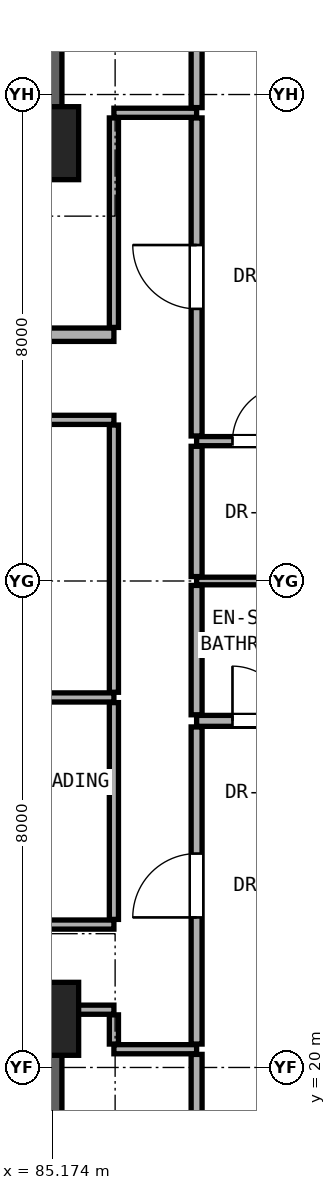
"""IFC4 building model, lengths in metres.
Left out: names, types, materials, properties, quantities, classifications, styles, units other than length and angle.
Written with IfcOpenShell. Run it as: python <this file> out.ifc"""

import sys

from ifc_helpers import new_model, si_unit, direction, frame, frame_2d, origin, origin_2d, place, context, subcontext, project, spatial, rectangle, extrude, element, fill, save


model = new_model("IFC4")
c1 = context("Model", 3, precision=1e-05, world=origin(), true_north=direction((0.0, 1.0)))
c2 = subcontext(c1, "Body", "Model", "MODEL_VIEW")
j1 = project(units=[si_unit("LENGTHUNIT", "METRE"), si_unit("PLANEANGLEUNIT", "RADIAN")], contexts=[c1])
p1 = place(None, origin())
s1 = spatial("IfcSite", under=j1, at=p1, CompositionType="ELEMENT")
p2 = place(p1, origin())
s2 = spatial("IfcBuilding", under=s1, at=p2, CompositionType="ELEMENT")
p3 = place(p2, frame((0.0, 0.0, 98.3)))
s3 = spatial("IfcBuildingStorey", under=s2, at=p3, CompositionType="ELEMENT", Elevation=98.3)
for number, where, z_axis, x_axis in (
    (1, (85.0, 20.8, 0.0), (0.0, 0.0, 1.0), (1.0, 0.0, 0.0)),
    (2, (85.0, 35.2, 0.0), (0.0, 0.0, 1.0), (1.0, 0.0, 0.0)),
):
    element("IfcColumn", number, at=place(p3, frame(where, z_axis=z_axis, x_axis=x_axis)), inside=s3, PredefinedType="COLUMN", context=c2, shape_type="SweptSolid", body=[
        extrude(rectangle(XDim=1.2, YDim=1.2, at=origin_2d()), origin(), (0.0, 0.0, 1.0), 3.3),
    ])
for number, where, z_axis, x_axis in (
    (3, (85.0, 35.2, 0.0), (0.0, 0.0, 1.0), (0.0, 1.0, 0.0)),
    (4, (85.0, 15.2, 0.0), (0.0, 0.0, 1.0), (0.0, 1.0, 0.0)),
):
    element("IfcWall", number, at=place(p3, frame(where, z_axis=z_axis, x_axis=x_axis)), inside=s3, PredefinedType="SHEAR", context=c2, shape_type="SweptSolid", body=[
        extrude(rectangle(XDim=5.6, YDim=0.65, at=frame_2d((2.8, 0.0))), origin(), (0.0, 0.0, 1.0), 3.08),
    ])
p4 = place(p3, frame((86.18, 20.3, 0.0), z_axis=(0.0, 0.0, 1.0), x_axis=(1.0, 0.0, 0.0)))
e5 = element("IfcWall", 5, at=p4, inside=s3, PredefinedType="PARTITIONING", context=c2, shape_type="SweptSolid", body=[
    extrude(rectangle(XDim=1.36, YDim=0.15, at=frame_2d((0.68, 0.0))), origin(), (0.0, 0.0, 1.0), 3.08),
])
p5 = place(p3, frame((85.32, 20.95, 0.0), z_axis=(0.0, 0.0, 1.0), x_axis=(1.0, 0.0, 0.0)))
e6 = element("IfcWall", 6, at=p5, inside=s3, PredefinedType="PARTITIONING", context=c2, shape_type="SweptSolid", body=[
    extrude(rectangle(XDim=0.86, YDim=0.15, at=frame_2d((0.43, 0.0))), origin(), (0.0, 0.0, 1.0), 2.472),
])
p6 = place(p3, frame((66.68, 22.35, 0.0), z_axis=(0.0, 0.0, 1.0), x_axis=(1.0, 0.0, 0.0)))
e7 = element("IfcWall", 7, at=p6, inside=s3, PredefinedType="PARTITIONING", context=c2, shape_type="SweptSolid", body=[
    extrude(rectangle(XDim=19.5, YDim=0.15, at=frame_2d((9.75, 0.0))), origin(), (0.0, 0.0, 1.0), 2.145),
])
p7 = place(p6, frame((8.902, 0.0, 0.0)))
e8 = element("IfcOpeningElement", 8, at=p7, cuts=e7, PredefinedType="OPENING", context=c2, shape_type="SweptSolid", body=[
    extrude(rectangle(XDim=0.85, YDim=2.01, at=frame_2d((0.425, 1.005))), frame((0.0, 0.085, 0.0), z_axis=(0.0, -1.0, 0.0), x_axis=(1.0, 0.0, 0.0)), (0.0, 0.0, 1.0), 0.17),
])
p8 = place(p6, frame((15.947, 0.0, 0.0)))
e9 = element("IfcOpeningElement", 9, at=p8, cuts=e7, PredefinedType="OPENING", context=c2, shape_type="SweptSolid", body=[
    extrude(rectangle(XDim=0.85, YDim=2.01, at=frame_2d((0.425, 1.005))), frame((0.0, 0.085, 0.0), z_axis=(0.0, -1.0, 0.0), x_axis=(1.0, 0.0, 0.0)), (0.0, 0.0, 1.0), 0.17),
])
p9 = place(p3, frame((87.54, 25.7, 0.0), z_axis=(0.0, 0.0, 1.0), x_axis=(1.0, 0.0, 0.0)))
e10 = element("IfcWall", 10, at=p9, inside=s3, PredefinedType="PARTITIONING", context=c2, shape_type="SweptSolid", body=[
    extrude(rectangle(XDim=6.816, YDim=0.18, at=frame_2d((3.408, 0.0))), origin(), (0.0, 0.0, 1.0), 2.216),
])
p10 = place(p9, frame((3.933, 0.0, 0.0)))
e11 = element("IfcOpeningElement", 11, at=p10, cuts=e10, PredefinedType="OPENING", context=c2, shape_type="SweptSolid", body=[
    extrude(rectangle(XDim=0.95, YDim=2.15, at=frame_2d((0.475, 1.075))), frame((0.0, 0.1, 0.0), z_axis=(0.0, -1.0, 0.0), x_axis=(1.0, 0.0, 0.0)), (0.0, 0.0, 1.0), 0.2),
])
p11 = place(p9, frame((0.59, 0.0, 0.0)))
e12 = element("IfcOpeningElement", 12, at=p11, cuts=e10, PredefinedType="OPENING", context=c2, shape_type="SweptSolid", body=[
    extrude(rectangle(XDim=0.9, YDim=2.1, at=frame_2d((0.45, 1.05))), frame((0.0, 0.1, 0.0), z_axis=(0.0, -1.0, 0.0), x_axis=(1.0, 0.0, 0.0)), (0.0, 0.0, 1.0), 0.2),
])
p12 = place(p3, frame((72.05, 26.085, 0.0), z_axis=(0.0, 0.0, 1.0), x_axis=(1.0, 0.0, 0.0)))
e13 = element("IfcWall", 13, at=p12, inside=s3, PredefinedType="PARTITIONING", context=c2, shape_type="SweptSolid", body=[
    extrude(rectangle(XDim=14.13, YDim=0.15, at=frame_2d((7.065, 0.0))), origin(), (0.0, 0.0, 1.0), 2.145),
])
p13 = place(p3, frame((87.54, 28.0, 0.0), z_axis=(0.0, 0.0, 1.0), x_axis=(1.0, 0.0, 0.0)))
e14 = element("IfcWall", 14, at=p13, inside=s3, PredefinedType="PARTITIONING", context=c2, shape_type="SweptSolid", body=[
    extrude(rectangle(XDim=6.816, YDim=0.125, at=frame_2d((3.408, 0.0))), origin(), (0.0, 0.0, 1.0), 2.216),
])
p14 = place(p3, frame((87.54, 30.3, 0.0), z_axis=(0.0, 0.0, 1.0), x_axis=(1.0, 0.0, 0.0)))
e15 = element("IfcWall", 15, at=p14, inside=s3, PredefinedType="PARTITIONING", context=c2, shape_type="SweptSolid", body=[
    extrude(rectangle(XDim=6.816, YDim=0.15, at=frame_2d((3.408, 0.0))), origin(), (0.0, 0.0, 1.0), 2.216),
])
p15 = place(p14, frame((3.933, 0.0, 0.0)))
e16 = element("IfcOpeningElement", 16, at=p15, cuts=e15, PredefinedType="OPENING", context=c2, shape_type="SweptSolid", body=[
    extrude(rectangle(XDim=0.95, YDim=2.15, at=frame_2d((0.475, 1.075))), frame((0.0, 0.085, 0.0), z_axis=(0.0, -1.0, 0.0), x_axis=(1.0, 0.0, 0.0)), (0.0, 0.0, 1.0), 0.17),
])
p16 = place(p14, frame((0.59, 0.0, 0.0)))
e17 = element("IfcOpeningElement", 17, at=p16, cuts=e15, PredefinedType="OPENING", context=c2, shape_type="SweptSolid", body=[
    extrude(rectangle(XDim=0.9, YDim=2.1, at=frame_2d((0.45, 1.05))), frame((0.0, 0.085, 0.0), z_axis=(0.0, -1.0, 0.0), x_axis=(1.0, 0.0, 0.0)), (0.0, 0.0, 1.0), 0.17),
])
p17 = place(p3, frame((66.68, 30.65, 0.0), z_axis=(0.0, 0.0, 1.0), x_axis=(1.0, 0.0, 0.0)))
e18 = element("IfcWall", 18, at=p17, inside=s3, PredefinedType="PARTITIONING", context=c2, shape_type="SweptSolid", body=[
    extrude(rectangle(XDim=19.5, YDim=0.15, at=frame_2d((9.75, 0.0))), origin(), (0.0, 0.0, 1.0), 2.145),
])
p18 = place(p17, frame((3.795, 0.0, 0.0)))
e19 = element("IfcOpeningElement", 19, at=p18, cuts=e18, PredefinedType="OPENING", context=c2, shape_type="SweptSolid", body=[
    extrude(rectangle(XDim=0.85, YDim=2.01, at=frame_2d((0.425, 1.005))), frame((0.0, 0.085, 0.0), z_axis=(0.0, -1.0, 0.0), x_axis=(1.0, 0.0, 0.0)), (0.0, 0.0, 1.0), 0.17),
])
p19 = place(p17, frame((8.902, 0.0, 0.0)))
e20 = element("IfcOpeningElement", 20, at=p19, cuts=e18, PredefinedType="OPENING", context=c2, shape_type="SweptSolid", body=[
    extrude(rectangle(XDim=0.85, YDim=2.01, at=frame_2d((0.425, 1.005))), frame((0.0, 0.085, 0.0), z_axis=(0.0, -1.0, 0.0), x_axis=(1.0, 0.0, 0.0)), (0.0, 0.0, 1.0), 0.17),
])
p20 = place(p17, frame((15.947, 0.0, 0.0)))
e21 = element("IfcOpeningElement", 21, at=p20, cuts=e18, PredefinedType="OPENING", context=c2, shape_type="SweptSolid", body=[
    extrude(rectangle(XDim=0.85, YDim=2.01, at=frame_2d((0.425, 1.005))), frame((0.0, 0.085, 0.0), z_axis=(0.0, -1.0, 0.0), x_axis=(1.0, 0.0, 0.0)), (0.0, 0.0, 1.0), 0.17),
])
p21 = place(p3, frame((71.55, 32.05, 0.0), z_axis=(0.0, 0.0, 1.0), x_axis=(1.0, 0.0, 0.0)))
e22 = element("IfcWall", 22, at=p21, inside=s3, PredefinedType="SOLIDWALL", context=c2, shape_type="SweptSolid", body=[
    extrude(rectangle(XDim=14.63, YDim=0.22, at=frame_2d((7.315, 0.0))), origin(), (0.0, 0.0, 1.0), 2.145),
])
p22 = place(p21, frame((6.065, 0.0, 0.0)))
e23 = element("IfcOpeningElement", 23, at=p22, cuts=e22, PredefinedType="OPENING", context=c2, shape_type="SweptSolid", body=[
    extrude(rectangle(XDim=0.85, YDim=2.01, at=frame_2d((0.425, 1.005))), frame((0.0, 0.12, 0.0), z_axis=(0.0, -1.0, 0.0), x_axis=(1.0, 0.0, 0.0)), (0.0, 0.0, 1.0), 0.24),
])
p23 = place(p21, frame((10.585, 0.0, 0.0)))
e24 = element("IfcOpeningElement", 24, at=p23, cuts=e22, PredefinedType="OPENING", context=c2, shape_type="SweptSolid", body=[
    extrude(rectangle(XDim=0.85, YDim=2.01, at=frame_2d((0.425, 1.005))), frame((0.0, 0.12, 0.0), z_axis=(0.0, -1.0, 0.0), x_axis=(1.0, 0.0, 0.0)), (0.0, 0.0, 1.0), 0.24),
])
p24 = place(p21, frame((0.7, 0.0, 0.0)))
e25 = element("IfcOpeningElement", 25, at=p24, cuts=e22, PredefinedType="OPENING", context=c2, shape_type="SweptSolid", body=[
    extrude(rectangle(XDim=0.85, YDim=2.01, at=frame_2d((0.425, 1.005))), frame((0.0, 0.12, 0.0), z_axis=(0.0, -1.0, 0.0), x_axis=(1.0, 0.0, 0.0)), (0.0, 0.0, 1.0), 0.24),
])
p25 = place(p21, frame((2.55, 0.0, 0.0)))
e26 = element("IfcOpeningElement", 26, at=p25, cuts=e22, PredefinedType="OPENING", context=c2, shape_type="SweptSolid", body=[
    extrude(rectangle(XDim=0.85, YDim=2.01, at=frame_2d((0.425, 1.005))), frame((0.0, 0.12, 0.0), z_axis=(0.0, -1.0, 0.0), x_axis=(1.0, 0.0, 0.0)), (0.0, 0.0, 1.0), 0.24),
])
p26 = place(p3, frame((86.18, 35.7, 0.0), z_axis=(0.0, 0.0, 1.0), x_axis=(1.0, 0.0, 0.0)))
e27 = element("IfcWall", 27, at=p26, inside=s3, PredefinedType="PARTITIONING", context=c2, shape_type="SweptSolid", body=[
    extrude(rectangle(XDim=1.36, YDim=0.15, at=frame_2d((0.68, 0.0))), origin(), (0.0, 0.0, 1.0), 3.08),
])
p27 = place(p3, frame((86.18, 20.385, 0.0), z_axis=(0.0, 0.0, 1.0), x_axis=(0.0, 1.0, 0.0)))
e28 = element("IfcWall", 28, at=p27, inside=s3, PredefinedType="PARTITIONING", context=c2, shape_type="SweptSolid", body=[
    extrude(rectangle(XDim=0.48, YDim=0.15, at=frame_2d((0.24, 0.0))), origin(), (0.0, 0.0, 1.0), 2.472),
])
p28 = place(p3, frame((86.18, 22.435, 0.0), z_axis=(0.0, 0.0, 1.0), x_axis=(0.0, 1.0, 0.0)))
e29 = element("IfcWall", 29, at=p28, inside=s3, PredefinedType="PARTITIONING", context=c2, shape_type="SweptSolid", body=[
    extrude(rectangle(XDim=3.565, YDim=0.15, at=frame_2d((1.782, 0.0))), origin(), (0.0, 0.0, 1.0), 3.08),
])
p29 = place(p3, frame((86.18, 26.17, 0.0), z_axis=(0.0, 0.0, 1.0), x_axis=(0.0, 1.0, 0.0)))
e30 = element("IfcWall", 30, at=p29, inside=s3, PredefinedType="PARTITIONING", context=c2, shape_type="SweptSolid", body=[
    extrude(rectangle(XDim=4.395, YDim=0.15, at=frame_2d((2.198, 0.0))), origin(), (0.0, 0.0, 1.0), 2.299),
])
p30 = place(p3, frame((86.18, 32.17, 0.0), z_axis=(0.0, 0.0, 1.0), x_axis=(0.0, 1.0, 0.0)))
e31 = element("IfcWall", 31, at=p30, inside=s3, PredefinedType="PARTITIONING", context=c2, shape_type="SweptSolid", body=[
    extrude(rectangle(XDim=3.445, YDim=0.15, at=frame_2d((1.723, 0.0))), origin(), (0.0, 0.0, 1.0), 2.472),
])
p31 = place(p3, frame((87.54, 16.769, 0.0), z_axis=(0.0, 0.0, 1.0), x_axis=(0.0, 1.0, 0.0)))
e32 = element("IfcWall", 32, at=p31, inside=s3, PredefinedType="PARTITIONING", context=c2, shape_type="SweptSolid", body=[
    extrude(rectangle(XDim=3.446, YDim=0.18, at=frame_2d((1.723, 0.0))), origin(), (0.0, 0.0, 1.0), 2.456),
])
p32 = place(p3, frame((87.54, 20.385, 0.0), z_axis=(0.0, 0.0, 1.0), x_axis=(0.0, 1.0, 0.0)))
e33 = element("IfcWall", 33, at=p32, inside=s3, PredefinedType="PARTITIONING", context=c2, shape_type="SweptSolid", body=[
    extrude(rectangle(XDim=5.215, YDim=0.18, at=frame_2d((2.607, 0.0))), origin(), (0.0, 0.0, 1.0), 2.472),
])
p33 = place(p32, frame((2.083, 0.0, 0.0)))
e34 = element("IfcOpeningElement", 34, at=p33, cuts=e33, PredefinedType="OPENING", context=c2, shape_type="SweptSolid", body=[
    extrude(rectangle(XDim=1.05, YDim=2.2, at=frame_2d((0.525, 1.1))), frame((0.0, 0.1, 0.0), z_axis=(0.0, -1.0, 0.0), x_axis=(1.0, 0.0, 0.0)), (0.0, 0.0, 1.0), 0.2),
])
p34 = place(p3, frame((87.54, 25.8, 0.0), z_axis=(0.0, 0.0, 1.0), x_axis=(0.0, 1.0, 0.0)))
e35 = element("IfcWall", 35, at=p34, inside=s3, PredefinedType="PARTITIONING", context=c2, shape_type="SweptSolid", body=[
    extrude(rectangle(XDim=2.127, YDim=0.18, at=frame_2d((1.064, 0.0))), origin(), (0.0, 0.0, 1.0), 2.299),
])
p35 = place(p3, frame((87.54, 28.073, 0.0), z_axis=(0.0, 0.0, 1.0), x_axis=(0.0, 1.0, 0.0)))
e36 = element("IfcWall", 36, at=p35, inside=s3, PredefinedType="PARTITIONING", context=c2, shape_type="SweptSolid", body=[
    extrude(rectangle(XDim=2.143, YDim=0.18, at=frame_2d((1.071, 0.0))), origin(), (0.0, 0.0, 1.0), 2.299),
])
p36 = place(p3, frame((87.54, 30.385, 0.0), z_axis=(0.0, 0.0, 1.0), x_axis=(0.0, 1.0, 0.0)))
e37 = element("IfcWall", 37, at=p36, inside=s3, PredefinedType="PARTITIONING", context=c2, shape_type="SweptSolid", body=[
    extrude(rectangle(XDim=5.23, YDim=0.18, at=frame_2d((2.615, 0.0))), origin(), (0.0, 0.0, 1.0), 2.472),
])
p37 = place(p36, frame((2.09, 0.0, 0.0)))
e38 = element("IfcOpeningElement", 38, at=p37, cuts=e37, PredefinedType="OPENING", context=c2, shape_type="SweptSolid", body=[
    extrude(rectangle(XDim=1.05, YDim=2.2, at=frame_2d((0.525, 1.1))), frame((0.0, 0.1, 0.0), z_axis=(0.0, -1.0, 0.0), x_axis=(1.0, 0.0, 0.0)), (0.0, 0.0, 1.0), 0.2),
])
p38 = place(p3, frame((87.54, 35.785, 0.0), z_axis=(0.0, 0.0, 1.0), x_axis=(0.0, 1.0, 0.0)))
e39 = element("IfcWall", 39, at=p38, inside=s3, PredefinedType="PARTITIONING", context=c2, shape_type="SweptSolid", body=[
    extrude(rectangle(XDim=3.461, YDim=0.18, at=frame_2d((1.73, 0.0))), origin(), (0.0, 0.0, 1.0), 2.456),
])
p39 = place(p33, origin())
e40 = element("IfcDoor", 40, at=p39, inside=s3, OperationType="SINGLE_SWING_LEFT", PredefinedType="DOOR", context=c2, shape_type="SweptSolid", body=[
    extrude(rectangle(XDim=1.05, YDim=2.2, at=frame_2d((0.525, 1.1))), frame((0.0, 0.025, 0.0), z_axis=(0.0, -1.0, 0.0), x_axis=(1.0, 0.0, 0.0)), (0.0, 0.0, 1.0), 0.05),
])
fill(e34, e40)
p40 = place(p11, origin())
e41 = element("IfcDoor", 41, at=p40, inside=s3, OperationType="SINGLE_SWING_LEFT", PredefinedType="DOOR", context=c2, shape_type="SweptSolid", body=[
    extrude(rectangle(XDim=0.9, YDim=2.1, at=frame_2d((0.45, 1.05))), frame((0.0, 0.025, 0.0), z_axis=(0.0, -1.0, 0.0), x_axis=(1.0, 0.0, 0.0)), (0.0, 0.0, 1.0), 0.05),
])
fill(e12, e41)
p41 = place(p37, origin())
e42 = element("IfcDoor", 42, at=p41, inside=s3, OperationType="SINGLE_SWING_RIGHT", PredefinedType="DOOR", context=c2, shape_type="SweptSolid", body=[
    extrude(rectangle(XDim=1.05, YDim=2.2, at=frame_2d((0.525, 1.1))), frame((0.0, 0.025, 0.0), z_axis=(0.0, -1.0, 0.0), x_axis=(1.0, 0.0, 0.0)), (0.0, 0.0, 1.0), 0.05),
])
fill(e38, e42)
p42 = place(p16, origin())
e43 = element("IfcDoor", 43, at=p42, inside=s3, OperationType="SINGLE_SWING_RIGHT", PredefinedType="DOOR", context=c2, shape_type="SweptSolid", body=[
    extrude(rectangle(XDim=0.9, YDim=2.1, at=frame_2d((0.45, 1.05))), frame((0.0, 0.025, 0.0), z_axis=(0.0, -1.0, 0.0), x_axis=(1.0, 0.0, 0.0)), (0.0, 0.0, 1.0), 0.05),
])
fill(e17, e43)
save(model, sys.argv[1])
